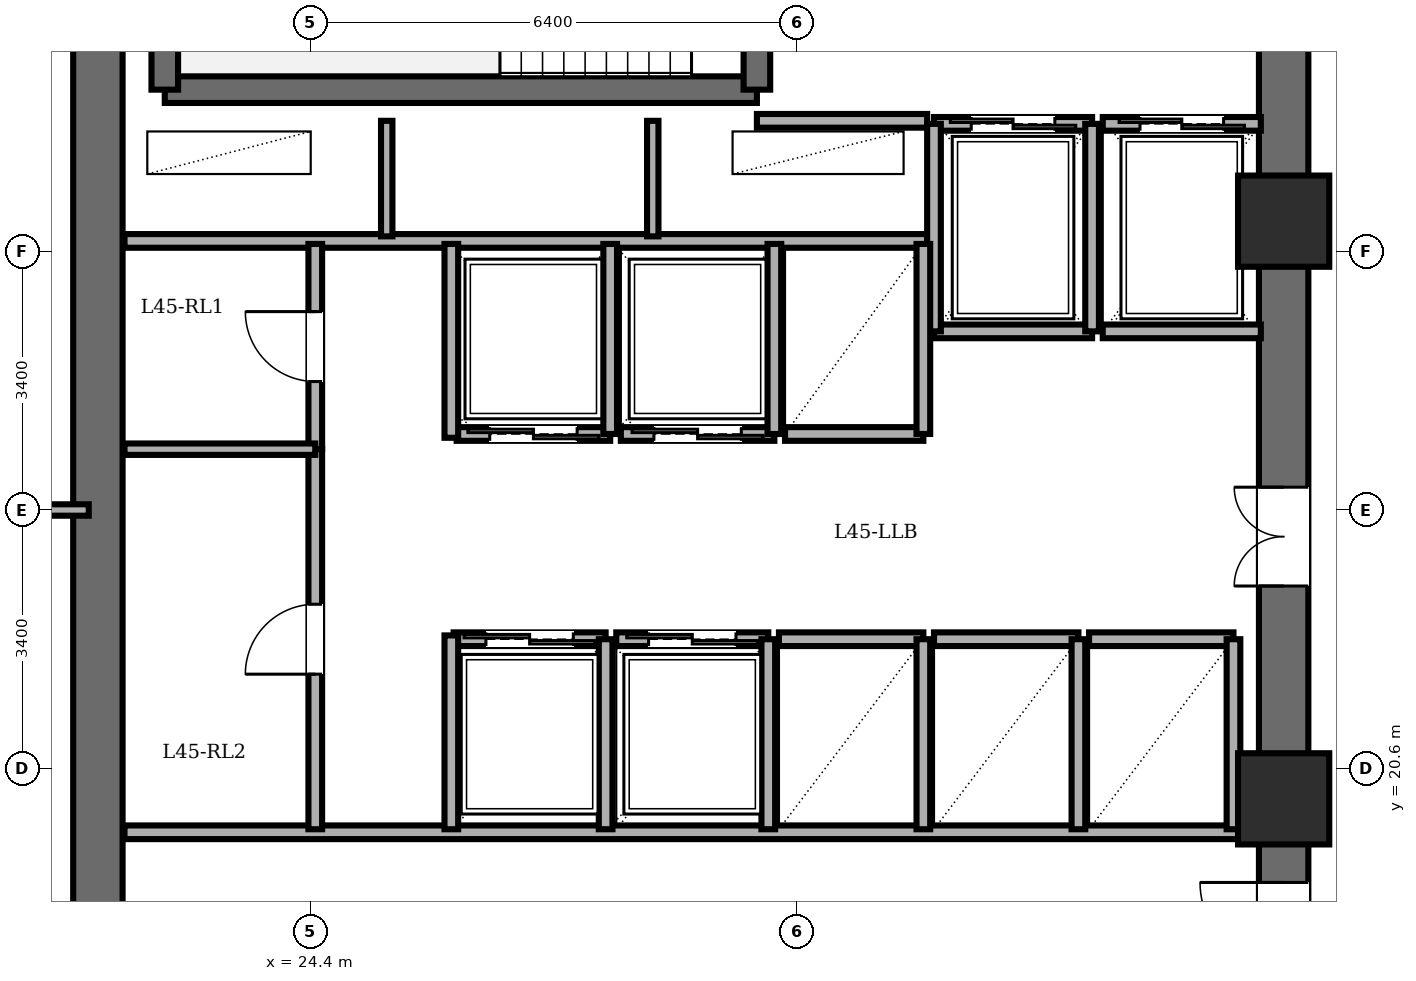
"""IFC4 building model, lengths in metres.
Left out: names, types, materials, properties, quantities, classifications, styles, units other than length and angle.
Written with IfcOpenShell. Run it as: python <this file> out.ifc"""

import sys

from ifc_helpers import new_model, si_unit, direction, frame, frame_2d, origin, origin_2d, place, context, subcontext, project, spatial, rectangle, extrude, element, fill, save


model = new_model("IFC4")
c1 = context("Model", 3, precision=1e-05, world=origin(), true_north=direction((0.0, 1.0)))
c2 = subcontext(c1, "Body", "Model", "MODEL_VIEW")
j1 = project(units=[si_unit("LENGTHUNIT", "METRE"), si_unit("PLANEANGLEUNIT", "RADIAN")], contexts=[c1])
p1 = place(None, origin())
s1 = spatial("IfcSite", under=j1, at=p1, CompositionType="ELEMENT")
p2 = place(p1, origin())
s2 = spatial("IfcBuilding", under=s1, at=p2, CompositionType="ELEMENT")
p3 = place(p2, frame((0.0, 0.0, 172.6)))
s3 = spatial("IfcBuildingStorey", under=s2, at=p3, CompositionType="ELEMENT", Elevation=172.6)
for number, where, z_axis, x_axis in (
    (1, (37.2, 20.2, 0.0), (0.0, 0.0, 1.0), (1.0, 0.0, 0.0)),
    (2, (37.2, 27.8, 0.0), (0.0, 0.0, 1.0), (1.0, 0.0, 0.0)),
):
    element("IfcColumn", number, at=place(p3, frame(where, z_axis=z_axis, x_axis=x_axis)), inside=s3, PredefinedType="COLUMN", context=c2, shape_type="SweptSolid", body=[
        extrude(rectangle(XDim=1.2, YDim=1.2, at=origin_2d()), origin(), (0.0, 0.0, 1.0), 3.6),
    ])
p4 = place(p3, frame((21.6, 14.4, 0.0), z_axis=(0.0, 0.0, 1.0), x_axis=(0.0, 1.0, 0.0)))
e3 = element("IfcWall", 3, at=p4, inside=s3, PredefinedType="SHEAR", context=c2, shape_type="SweptSolid", body=[
    extrude(rectangle(XDim=19.2, YDim=0.65, at=frame_2d((9.6, 0.0))), origin(), (0.0, 0.0, 1.0), 3.4),
])
p5 = place(p3, frame((37.2, 14.4, 0.0), z_axis=(0.0, 0.0, 1.0), x_axis=(0.0, 1.0, 0.0)))
e4 = element("IfcWall", 4, at=p5, inside=s3, PredefinedType="SHEAR", context=c2, shape_type="SweptSolid", body=[
    extrude(rectangle(XDim=19.2, YDim=0.65, at=frame_2d((9.6, 0.0))), origin(), (0.0, 0.0, 1.0), 3.4),
])
p6 = place(p5, frame((15.8, 0.0, 0.0)))
e5 = element("IfcOpeningElement", 5, at=p6, cuts=e4, PredefinedType="OPENING", context=c2, shape_type="SweptSolid", body=[
    extrude(rectangle(XDim=1.15, YDim=2.15, at=frame_2d((0.575, 1.075))), frame((0.0, 0.335, 0.0), z_axis=(0.0, -1.0, 0.0), x_axis=(1.0, 0.0, 0.0)), (0.0, 0.0, 1.0), 0.67),
])
p7 = place(p5, frame((3.6, 0.0, 0.0)))
e6 = element("IfcOpeningElement", 6, at=p7, cuts=e4, PredefinedType="OPENING", context=c2, shape_type="SweptSolid", body=[
    extrude(rectangle(XDim=1.1, YDim=2.15, at=frame_2d((0.55, 1.075))), frame((0.0, 0.335, 0.0), z_axis=(0.0, -1.0, 0.0), x_axis=(1.0, 0.0, 0.0)), (0.0, 0.0, 1.0), 0.67),
])
p8 = place(p5, frame((8.6, 0.0, 0.0)))
e7 = element("IfcOpeningElement", 7, at=p8, cuts=e4, PredefinedType="OPENING", context=c2, shape_type="SweptSolid", body=[
    extrude(rectangle(XDim=1.3, YDim=2.2, at=frame_2d((0.65, 1.1))), frame((0.0, 0.335, 0.0), z_axis=(0.0, -1.0, 0.0), x_axis=(1.0, 0.0, 0.0)), (0.0, 0.0, 1.0), 0.67),
])
p9 = place(p3, frame((22.48, 29.53, 0.0), z_axis=(0.0, 0.0, 1.0), x_axis=(1.0, 0.0, 0.0)))
e8 = element("IfcWall", 8, at=p9, inside=s3, PredefinedType="SOLIDWALL", context=c2, shape_type="SweptSolid", body=[
    extrude(rectangle(XDim=7.79, YDim=0.35, at=frame_2d((3.895, 0.0))), origin(), (0.0, 0.0, 1.0), 3.4),
])
p10 = place(p3, frame((22.48, 29.53, 0.0), z_axis=(0.0, 0.0, 1.0), x_axis=(0.0, 1.0, 0.0)))
e9 = element("IfcWall", 9, at=p10, inside=s3, PredefinedType="SOLIDWALL", context=c2, shape_type="SweptSolid", body=[
    extrude(rectangle(XDim=3.58, YDim=0.35, at=frame_2d((1.79, 0.0))), origin(), (0.0, 0.0, 1.0), 3.4),
])
p11 = place(p3, frame((30.27, 29.53, 0.0), z_axis=(0.0, 0.0, 1.0), x_axis=(0.0, 1.0, 0.0)))
e10 = element("IfcWall", 10, at=p11, inside=s3, PredefinedType="SOLIDWALL", context=c2, shape_type="SweptSolid", body=[
    extrude(rectangle(XDim=3.58, YDim=0.35, at=frame_2d((1.79, 0.0))), origin(), (0.0, 0.0, 1.0), 3.4),
])
p12 = place(p11, frame((1.25, 0.0, 0.0)))
e11 = element("IfcOpeningElement", 11, at=p12, cuts=e10, PredefinedType="OPENING", context=c2, shape_type="SweptSolid", body=[
    extrude(rectangle(XDim=1.1, YDim=2.15, at=frame_2d((0.55, 1.075))), frame((0.0, 0.185, 0.0), z_axis=(0.0, -1.0, 0.0), x_axis=(1.0, 0.0, 0.0)), (0.0, 0.0, 1.0), 0.37),
])
p13 = place(p3, frame((30.27, 29.12, 0.0), z_axis=(0.0, 0.0, 1.0), x_axis=(1.0, 0.0, 0.0)))
e12 = element("IfcWall", 12, at=p13, inside=s3, PredefinedType="PARTITIONING", context=c2, shape_type="SweptSolid", body=[
    extrude(rectangle(XDim=2.24, YDim=0.18, at=frame_2d((1.12, 0.0))), origin(), (0.0, 0.0, 1.0), 3.4),
])
p14 = place(p3, frame((21.95, 27.54, 0.0), z_axis=(0.0, 0.0, 1.0), x_axis=(1.0, 0.0, 0.0)))
e13 = element("IfcWall", 13, at=p14, inside=s3, PredefinedType="PARTITIONING", context=c2, shape_type="SweptSolid", body=[
    extrude(rectangle(XDim=10.56, YDim=0.18, at=frame_2d((5.28, 0.0))), origin(), (0.0, 0.0, 1.0), 3.4),
])
for number, where, z_axis, x_axis in (
    (14, (25.4, 27.6, 0.0), (0.0, 0.0, 1.0), (0.0, 1.0, 0.0)),
    (15, (28.9, 27.6, 0.0), (0.0, 0.0, 1.0), (0.0, 1.0, 0.0)),
):
    element("IfcWall", number, at=place(p3, frame(where, z_axis=z_axis, x_axis=x_axis)), inside=s3, PredefinedType="PARTITIONING", context=c2, shape_type="SweptSolid", body=[
        extrude(rectangle(XDim=1.52, YDim=0.15, at=frame_2d((0.76, 0.0))), origin(), (0.0, 0.0, 1.0), 3.4),
    ])
p15 = place(p3, frame((21.95, 19.76, 0.0), z_axis=(0.0, 0.0, 1.0), x_axis=(1.0, 0.0, 0.0)))
e16 = element("IfcWall", 16, at=p15, inside=s3, PredefinedType="PARTITIONING", context=c2, shape_type="SweptSolid", body=[
    extrude(rectangle(XDim=14.87, YDim=0.18, at=frame_2d((7.435, 0.0))), origin(), (0.0, 0.0, 1.0), 3.4),
])
p16 = place(p3, frame((32.6, 29.08, 0.0), z_axis=(0.0, 0.0, 1.0), x_axis=(1.0, 0.0, 0.0)))
e17 = element("IfcWall", 17, at=p16, inside=s3, PredefinedType="PARTITIONING", context=c2, shape_type="SweptSolid", body=[
    extrude(rectangle(XDim=2.08, YDim=0.18, at=frame_2d((1.04, 0.0))), origin(), (0.0, 0.0, 1.0), 3.4),
])
p17 = place(p16, frame((0.49, 0.0, 0.0)))
e18 = element("IfcOpeningElement", 18, at=p17, cuts=e17, PredefinedType="OPENING", context=c2, shape_type="SweptSolid", body=[
    extrude(rectangle(XDim=1.1, YDim=2.2, at=frame_2d((0.55, 1.1))), frame((0.0, 0.1, 0.0), z_axis=(0.0, -1.0, 0.0), x_axis=(1.0, 0.0, 0.0)), (0.0, 0.0, 1.0), 0.2),
])
p18 = place(p3, frame((34.68, 26.35, 0.0), z_axis=(0.0, 0.0, 1.0), x_axis=(-1.0, 0.0, 0.0)))
e19 = element("IfcWall", 19, at=p18, inside=s3, PredefinedType="PARTITIONING", context=c2, shape_type="SweptSolid", body=[
    extrude(rectangle(XDim=2.08, YDim=0.18, at=frame_2d((1.04, 0.0))), origin(), (0.0, 0.0, 1.0), 3.4),
])
for number, where, z_axis, x_axis in (
    (20, (34.68, 26.35, 0.0), (0.0, 0.0, 1.0), (0.0, 1.0, 0.0)),
    (21, (32.6, 29.08, 0.0), (0.0, 0.0, 1.0), (0.0, -1.0, 0.0)),
):
    element("IfcWall", number, at=place(p3, frame(where, z_axis=z_axis, x_axis=x_axis)), inside=s3, PredefinedType="PARTITIONING", context=c2, shape_type="SweptSolid", body=[
        extrude(rectangle(XDim=2.73, YDim=0.18, at=frame_2d((1.365, 0.0))), origin(), (0.0, 0.0, 1.0), 3.4),
    ])
p19 = place(p3, frame((34.82, 29.08, 0.0), z_axis=(0.0, 0.0, 1.0), x_axis=(1.0, 0.0, 0.0)))
e22 = element("IfcWall", 22, at=p19, inside=s3, PredefinedType="PARTITIONING", context=c2, shape_type="SweptSolid", body=[
    extrude(rectangle(XDim=2.08, YDim=0.18, at=frame_2d((1.04, 0.0))), origin(), (0.0, 0.0, 1.0), 3.4),
])
p20 = place(p19, frame((0.49, 0.0, 0.0)))
e23 = element("IfcOpeningElement", 23, at=p20, cuts=e22, PredefinedType="OPENING", context=c2, shape_type="SweptSolid", body=[
    extrude(rectangle(XDim=1.1, YDim=2.2, at=frame_2d((0.55, 1.1))), frame((0.0, 0.1, 0.0), z_axis=(0.0, -1.0, 0.0), x_axis=(1.0, 0.0, 0.0)), (0.0, 0.0, 1.0), 0.2),
])
p21 = place(p3, frame((36.9, 26.35, 0.0), z_axis=(0.0, 0.0, 1.0), x_axis=(-1.0, 0.0, 0.0)))
e24 = element("IfcWall", 24, at=p21, inside=s3, PredefinedType="PARTITIONING", context=c2, shape_type="SweptSolid", body=[
    extrude(rectangle(XDim=2.08, YDim=0.18, at=frame_2d((1.04, 0.0))), origin(), (0.0, 0.0, 1.0), 3.4),
])
p22 = place(p3, frame((28.34, 25.0, 0.0), z_axis=(0.0, 0.0, 1.0), x_axis=(-1.0, 0.0, 0.0)))
e25 = element("IfcWall", 25, at=p22, inside=s3, PredefinedType="PARTITIONING", context=c2, shape_type="SweptSolid", body=[
    extrude(rectangle(XDim=2.02, YDim=0.18, at=frame_2d((1.01, 0.0))), origin(), (0.0, 0.0, 1.0), 3.4),
])
p23 = place(p22, frame((0.435, 0.0, 0.0)))
e26 = element("IfcOpeningElement", 26, at=p23, cuts=e25, PredefinedType="OPENING", context=c2, shape_type="SweptSolid", body=[
    extrude(rectangle(XDim=1.15, YDim=2.2, at=frame_2d((0.575, 1.1))), frame((0.0, 0.1, 0.0), z_axis=(0.0, -1.0, 0.0), x_axis=(1.0, 0.0, 0.0)), (0.0, 0.0, 1.0), 0.2),
])
p24 = place(p3, frame((28.34, 25.0, 0.0), z_axis=(0.0, 0.0, 1.0), x_axis=(0.0, 1.0, 0.0)))
e27 = element("IfcWall", 27, at=p24, inside=s3, PredefinedType="PARTITIONING", context=c2, shape_type="SweptSolid", body=[
    extrude(rectangle(XDim=2.5, YDim=0.18, at=frame_2d((1.25, 0.0))), origin(), (0.0, 0.0, 1.0), 3.4),
])
p25 = place(p3, frame((30.5, 25.0, 0.0), z_axis=(0.0, 0.0, 1.0), x_axis=(-1.0, 0.0, 0.0)))
e28 = element("IfcWall", 28, at=p25, inside=s3, PredefinedType="PARTITIONING", context=c2, shape_type="SweptSolid", body=[
    extrude(rectangle(XDim=2.02, YDim=0.18, at=frame_2d((1.01, 0.0))), origin(), (0.0, 0.0, 1.0), 3.4),
])
p26 = place(p25, frame((0.435, 0.0, 0.0)))
e29 = element("IfcOpeningElement", 29, at=p26, cuts=e28, PredefinedType="OPENING", context=c2, shape_type="SweptSolid", body=[
    extrude(rectangle(XDim=1.15, YDim=2.2, at=frame_2d((0.575, 1.1))), frame((0.0, 0.1, 0.0), z_axis=(0.0, -1.0, 0.0), x_axis=(1.0, 0.0, 0.0)), (0.0, 0.0, 1.0), 0.2),
])
p27 = place(p3, frame((30.5, 25.0, 0.0), z_axis=(0.0, 0.0, 1.0), x_axis=(0.0, 1.0, 0.0)))
e30 = element("IfcWall", 30, at=p27, inside=s3, PredefinedType="PARTITIONING", context=c2, shape_type="SweptSolid", body=[
    extrude(rectangle(XDim=2.5, YDim=0.18, at=frame_2d((1.25, 0.0))), origin(), (0.0, 0.0, 1.0), 3.4),
])
p28 = place(p3, frame((26.28, 22.3, 0.0), z_axis=(0.0, 0.0, 1.0), x_axis=(1.0, 0.0, 0.0)))
e31 = element("IfcWall", 31, at=p28, inside=s3, PredefinedType="PARTITIONING", context=c2, shape_type="SweptSolid", body=[
    extrude(rectangle(XDim=2.0, YDim=0.18, at=frame_2d((1.0, 0.0))), origin(), (0.0, 0.0, 1.0), 3.4),
])
p29 = place(p28, frame((0.425, 0.0, 0.0)))
e32 = element("IfcOpeningElement", 32, at=p29, cuts=e31, PredefinedType="OPENING", context=c2, shape_type="SweptSolid", body=[
    extrude(rectangle(XDim=1.15, YDim=2.2, at=frame_2d((0.575, 1.1))), frame((0.0, 0.1, 0.0), z_axis=(0.0, -1.0, 0.0), x_axis=(1.0, 0.0, 0.0)), (0.0, 0.0, 1.0), 0.2),
])
p30 = place(p3, frame((28.28, 19.8, 0.0), z_axis=(0.0, 0.0, 1.0), x_axis=(0.0, 1.0, 0.0)))
e33 = element("IfcWall", 33, at=p30, inside=s3, PredefinedType="PARTITIONING", context=c2, shape_type="SweptSolid", body=[
    extrude(rectangle(XDim=2.5, YDim=0.18, at=frame_2d((1.25, 0.0))), origin(), (0.0, 0.0, 1.0), 3.4),
])
p31 = place(p3, frame((28.42, 22.3, 0.0), z_axis=(0.0, 0.0, 1.0), x_axis=(1.0, 0.0, 0.0)))
e34 = element("IfcWall", 34, at=p31, inside=s3, PredefinedType="PARTITIONING", context=c2, shape_type="SweptSolid", body=[
    extrude(rectangle(XDim=2.0, YDim=0.18, at=frame_2d((1.0, 0.0))), origin(), (0.0, 0.0, 1.0), 3.4),
])
p32 = place(p31, frame((0.425, 0.0, 0.0)))
e35 = element("IfcOpeningElement", 35, at=p32, cuts=e34, PredefinedType="OPENING", context=c2, shape_type="SweptSolid", body=[
    extrude(rectangle(XDim=1.15, YDim=2.2, at=frame_2d((0.575, 1.1))), frame((0.0, 0.1, 0.0), z_axis=(0.0, -1.0, 0.0), x_axis=(1.0, 0.0, 0.0)), (0.0, 0.0, 1.0), 0.2),
])
p33 = place(p3, frame((30.42, 19.8, 0.0), z_axis=(0.0, 0.0, 1.0), x_axis=(0.0, 1.0, 0.0)))
e36 = element("IfcWall", 36, at=p33, inside=s3, PredefinedType="PARTITIONING", context=c2, shape_type="SweptSolid", body=[
    extrude(rectangle(XDim=2.5, YDim=0.18, at=frame_2d((1.25, 0.0))), origin(), (0.0, 0.0, 1.0), 3.4),
])
p34 = place(p3, frame((32.46, 25.0, 0.0), z_axis=(0.0, 0.0, 1.0), x_axis=(-1.0, 0.0, 0.0)))
e37 = element("IfcWall", 37, at=p34, inside=s3, PredefinedType="PARTITIONING", context=c2, shape_type="SweptSolid", body=[
    extrude(rectangle(XDim=1.82, YDim=0.18, at=frame_2d((0.91, 0.0))), origin(), (0.0, 0.0, 1.0), 3.4),
])
p35 = place(p3, frame((32.46, 25.0, 0.0), z_axis=(0.0, 0.0, 1.0), x_axis=(0.0, 1.0, 0.0)))
e38 = element("IfcWall", 38, at=p35, inside=s3, PredefinedType="PARTITIONING", context=c2, shape_type="SweptSolid", body=[
    extrude(rectangle(XDim=2.5, YDim=0.18, at=frame_2d((1.25, 0.0))), origin(), (0.0, 0.0, 1.0), 3.4),
])
p36 = place(p3, frame((30.56, 22.3, 0.0), z_axis=(0.0, 0.0, 1.0), x_axis=(1.0, 0.0, 0.0)))
e39 = element("IfcWall", 39, at=p36, inside=s3, PredefinedType="PARTITIONING", context=c2, shape_type="SweptSolid", body=[
    extrude(rectangle(XDim=1.9, YDim=0.18, at=frame_2d((0.95, 0.0))), origin(), (0.0, 0.0, 1.0), 3.4),
])
p37 = place(p3, frame((32.46, 19.8, 0.0), z_axis=(0.0, 0.0, 1.0), x_axis=(0.0, 1.0, 0.0)))
e40 = element("IfcWall", 40, at=p37, inside=s3, PredefinedType="PARTITIONING", context=c2, shape_type="SweptSolid", body=[
    extrude(rectangle(XDim=2.5, YDim=0.18, at=frame_2d((1.25, 0.0))), origin(), (0.0, 0.0, 1.0), 3.4),
])
p38 = place(p3, frame((32.6, 22.3, 0.0), z_axis=(0.0, 0.0, 1.0), x_axis=(1.0, 0.0, 0.0)))
e41 = element("IfcWall", 41, at=p38, inside=s3, PredefinedType="PARTITIONING", context=c2, shape_type="SweptSolid", body=[
    extrude(rectangle(XDim=1.9, YDim=0.18, at=frame_2d((0.95, 0.0))), origin(), (0.0, 0.0, 1.0), 3.4),
])
p39 = place(p3, frame((34.5, 19.8, 0.0), z_axis=(0.0, 0.0, 1.0), x_axis=(0.0, 1.0, 0.0)))
e42 = element("IfcWall", 42, at=p39, inside=s3, PredefinedType="PARTITIONING", context=c2, shape_type="SweptSolid", body=[
    extrude(rectangle(XDim=2.5, YDim=0.18, at=frame_2d((1.25, 0.0))), origin(), (0.0, 0.0, 1.0), 3.4),
])
p40 = place(p3, frame((34.64, 22.3, 0.0), z_axis=(0.0, 0.0, 1.0), x_axis=(1.0, 0.0, 0.0)))
e43 = element("IfcWall", 43, at=p40, inside=s3, PredefinedType="PARTITIONING", context=c2, shape_type="SweptSolid", body=[
    extrude(rectangle(XDim=1.9, YDim=0.18, at=frame_2d((0.95, 0.0))), origin(), (0.0, 0.0, 1.0), 3.4),
])
p41 = place(p3, frame((36.54, 19.8, 0.0), z_axis=(0.0, 0.0, 1.0), x_axis=(0.0, 1.0, 0.0)))
e44 = element("IfcWall", 44, at=p41, inside=s3, PredefinedType="PARTITIONING", context=c2, shape_type="SweptSolid", body=[
    extrude(rectangle(XDim=2.5, YDim=0.18, at=frame_2d((1.25, 0.0))), origin(), (0.0, 0.0, 1.0), 3.4),
])
p42 = place(p3, frame((24.46, 24.8, 0.0), z_axis=(0.0, 0.0, 1.0), x_axis=(0.0, 1.0, 0.0)))
e45 = element("IfcWall", 45, at=p42, inside=s3, PredefinedType="PARTITIONING", context=c2, shape_type="SweptSolid", body=[
    extrude(rectangle(XDim=2.7, YDim=0.18, at=frame_2d((1.35, 0.0))), origin(), (0.0, 0.0, 1.0), 3.4),
])
p43 = place(p42, frame((0.89, 0.0, 0.0)))
e46 = element("IfcOpeningElement", 46, at=p43, cuts=e45, PredefinedType="OPENING", context=c2, shape_type="SweptSolid", body=[
    extrude(rectangle(XDim=0.92, YDim=2.1, at=frame_2d((0.46, 1.05))), frame((0.0, 0.1, 0.0), z_axis=(0.0, -1.0, 0.0), x_axis=(1.0, 0.0, 0.0)), (0.0, 0.0, 1.0), 0.2),
])
p44 = place(p3, frame((24.46, 19.8, 0.0), z_axis=(0.0, 0.0, 1.0), x_axis=(0.0, 1.0, 0.0)))
e47 = element("IfcWall", 47, at=p44, inside=s3, PredefinedType="PARTITIONING", context=c2, shape_type="SweptSolid", body=[
    extrude(rectangle(XDim=5.0, YDim=0.18, at=frame_2d((2.5, 0.0))), origin(), (0.0, 0.0, 1.0), 3.4),
])
p45 = place(p44, frame((2.04, 0.0, 0.0)))
e48 = element("IfcOpeningElement", 48, at=p45, cuts=e47, PredefinedType="OPENING", context=c2, shape_type="SweptSolid", body=[
    extrude(rectangle(XDim=0.92, YDim=2.1, at=frame_2d((0.46, 1.05))), frame((0.0, 0.1, 0.0), z_axis=(0.0, -1.0, 0.0), x_axis=(1.0, 0.0, 0.0)), (0.0, 0.0, 1.0), 0.2),
])
p46 = place(p3, frame((21.95, 24.8, 0.0), z_axis=(0.0, 0.0, 1.0), x_axis=(1.0, 0.0, 0.0)))
e49 = element("IfcWall", 49, at=p46, inside=s3, PredefinedType="PARTITIONING", context=c2, shape_type="SweptSolid", body=[
    extrude(rectangle(XDim=2.51, YDim=0.15, at=frame_2d((1.255, 0.0))), origin(), (0.0, 0.0, 1.0), 3.4),
])
for number, where, z_axis, x_axis in (
    (50, (26.25, 24.95, 0.0), (0.0, 0.0, 1.0), (0.0, 1.0, 0.0)),
    (51, (26.25, 19.8, 0.0), (0.0, 0.0, 1.0), (0.0, 1.0, 0.0)),
):
    element("IfcWall", number, at=place(p3, frame(where, z_axis=z_axis, x_axis=x_axis)), inside=s3, PredefinedType="PARTITIONING", context=c2, shape_type="SweptSolid", body=[
        extrude(rectangle(XDim=2.55, YDim=0.18, at=frame_2d((1.275, 0.0))), origin(), (0.0, 0.0, 1.0), 3.4),
    ])
p47 = place(p3, frame((13.8, 24.0, 0.0), z_axis=(0.0, 0.0, 1.0), x_axis=(1.0, 0.0, 0.0)))
e52 = element("IfcWall", 52, at=p47, inside=s3, PredefinedType="PARTITIONING", context=c2, shape_type="SweptSolid", body=[
    extrude(rectangle(XDim=7.68, YDim=0.15, at=frame_2d((3.84, 0.0))), origin(), (0.0, 0.0, 1.0), 3.4),
])
p48 = place(p7, origin())
e53 = element("IfcDoor", 53, at=p48, inside=s3, OperationType="SINGLE_SWING_RIGHT", PredefinedType="DOOR", context=c2, shape_type="SweptSolid", body=[
    extrude(rectangle(XDim=1.1, YDim=2.15, at=frame_2d((0.55, 1.075))), frame((0.0, 0.025, 0.0), z_axis=(0.0, -1.0, 0.0), x_axis=(1.0, 0.0, 0.0)), (0.0, 0.0, 1.0), 0.05),
])
fill(e6, e53)
p49 = place(p17, origin())
e54 = element("IfcDoor", 54, at=p49, inside=s3, OperationType="DOUBLE_DOOR_SLIDING", PredefinedType="DOOR", context=c2, shape_type="SweptSolid", body=[
    extrude(rectangle(XDim=1.1, YDim=2.2, at=frame_2d((0.55, 1.1))), frame((0.0, 0.025, 0.0), z_axis=(0.0, -1.0, 0.0), x_axis=(1.0, 0.0, 0.0)), (0.0, 0.0, 1.0), 0.05),
])
fill(e18, e54)
p50 = place(p20, origin())
e55 = element("IfcDoor", 55, at=p50, inside=s3, OperationType="DOUBLE_DOOR_SLIDING", PredefinedType="DOOR", context=c2, shape_type="SweptSolid", body=[
    extrude(rectangle(XDim=1.1, YDim=2.2, at=frame_2d((0.55, 1.1))), frame((0.0, 0.025, 0.0), z_axis=(0.0, -1.0, 0.0), x_axis=(1.0, 0.0, 0.0)), (0.0, 0.0, 1.0), 0.05),
])
fill(e23, e55)
p51 = place(p23, origin())
e56 = element("IfcDoor", 56, at=p51, inside=s3, OperationType="DOUBLE_DOOR_SLIDING", PredefinedType="DOOR", context=c2, shape_type="SweptSolid", body=[
    extrude(rectangle(XDim=1.15, YDim=2.2, at=frame_2d((0.575, 1.1))), frame((0.0, 0.025, 0.0), z_axis=(0.0, -1.0, 0.0), x_axis=(1.0, 0.0, 0.0)), (0.0, 0.0, 1.0), 0.05),
])
fill(e26, e56)
p52 = place(p26, origin())
e57 = element("IfcDoor", 57, at=p52, inside=s3, OperationType="DOUBLE_DOOR_SLIDING", PredefinedType="DOOR", context=c2, shape_type="SweptSolid", body=[
    extrude(rectangle(XDim=1.15, YDim=2.2, at=frame_2d((0.575, 1.1))), frame((0.0, 0.025, 0.0), z_axis=(0.0, -1.0, 0.0), x_axis=(1.0, 0.0, 0.0)), (0.0, 0.0, 1.0), 0.05),
])
fill(e29, e57)
p53 = place(p29, origin())
e58 = element("IfcDoor", 58, at=p53, inside=s3, OperationType="DOUBLE_DOOR_SLIDING", PredefinedType="DOOR", context=c2, shape_type="SweptSolid", body=[
    extrude(rectangle(XDim=1.15, YDim=2.2, at=frame_2d((0.575, 1.1))), frame((0.0, 0.025, 0.0), z_axis=(0.0, -1.0, 0.0), x_axis=(1.0, 0.0, 0.0)), (0.0, 0.0, 1.0), 0.05),
])
fill(e32, e58)
p54 = place(p32, origin())
e59 = element("IfcDoor", 59, at=p54, inside=s3, OperationType="DOUBLE_DOOR_SLIDING", PredefinedType="DOOR", context=c2, shape_type="SweptSolid", body=[
    extrude(rectangle(XDim=1.15, YDim=2.2, at=frame_2d((0.575, 1.1))), frame((0.0, 0.025, 0.0), z_axis=(0.0, -1.0, 0.0), x_axis=(1.0, 0.0, 0.0)), (0.0, 0.0, 1.0), 0.05),
])
fill(e35, e59)
p55 = place(p43, origin())
e60 = element("IfcDoor", 60, at=p55, inside=s3, OperationType="SINGLE_SWING_RIGHT", PredefinedType="DOOR", context=c2, shape_type="SweptSolid", body=[
    extrude(rectangle(XDim=0.92, YDim=2.1, at=frame_2d((0.46, 1.05))), frame((0.0, 0.025, 0.0), z_axis=(0.0, -1.0, 0.0), x_axis=(1.0, 0.0, 0.0)), (0.0, 0.0, 1.0), 0.05),
])
fill(e46, e60)
p56 = place(p45, origin())
e61 = element("IfcDoor", 61, at=p56, inside=s3, OperationType="SINGLE_SWING_LEFT", PredefinedType="DOOR", context=c2, shape_type="SweptSolid", body=[
    extrude(rectangle(XDim=0.92, YDim=2.1, at=frame_2d((0.46, 1.05))), frame((0.0, 0.025, 0.0), z_axis=(0.0, -1.0, 0.0), x_axis=(1.0, 0.0, 0.0)), (0.0, 0.0, 1.0), 0.05),
])
fill(e48, e61)
p57 = place(p8, origin())
e62 = element("IfcDoor", 62, at=p57, inside=s3, OperationType="DOUBLE_DOOR_SINGLE_SWING", PredefinedType="DOOR", context=c2, shape_type="SweptSolid", body=[
    extrude(rectangle(XDim=1.3, YDim=2.2, at=frame_2d((0.65, 1.1))), frame((0.0, 0.025, 0.0), z_axis=(0.0, -1.0, 0.0), x_axis=(1.0, 0.0, 0.0)), (0.0, 0.0, 1.0), 0.05),
])
fill(e7, e62)
save(model, sys.argv[1])
